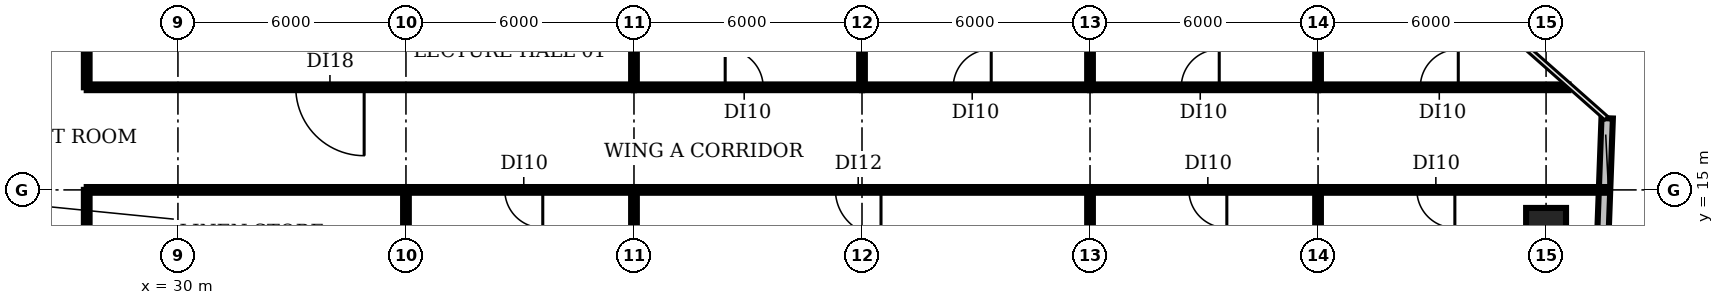
"""IFC4 building model, lengths in metres.
Left out: names, types, materials, properties, quantities, classifications, styles, units other than length and angle.
Written with IfcOpenShell. Run it as: python <this file> out.ifc"""

import sys

from ifc_helpers import new_model, si_unit, direction, frame, frame_2d, origin, origin_2d, place, context, subcontext, project, spatial, rectangle, circle, extrude, element, fill, save


model = new_model("IFC4")
c1 = context("Model", 3, precision=1e-05, world=origin(), true_north=direction((0.0, 1.0)))
c2 = subcontext(c1, "Body", "Model", "MODEL_VIEW")
j1 = project(units=[si_unit("LENGTHUNIT", "METRE"), si_unit("PLANEANGLEUNIT", "RADIAN")], contexts=[c1])
p1 = place(None, origin())
s1 = spatial("IfcSite", under=j1, at=p1, CompositionType="ELEMENT")
p2 = place(p1, origin())
s2 = spatial("IfcBuilding", under=s1, at=p2, CompositionType="ELEMENT")
p3 = place(p2, frame((0.0, 0.0, 66.8)))
s3 = spatial("IfcBuildingStorey", under=s2, at=p3, CompositionType="ELEMENT", Elevation=66.8)
p4 = place(p3, frame((66.0, 14.0, 0.0), z_axis=(0.0, 0.0, 1.0), x_axis=(1.0, 0.0, 0.0)))
e1 = element("IfcColumn", 1, at=p4, inside=s3, PredefinedType="COLUMN", context=c2, shape_type="SweptSolid", body=[
    extrude(circle(Radius=0.525, at=origin_2d()), origin(), (0.0, 0.0, 1.0), 3.85),
])
p5 = place(p3, frame((67.359, 10.104, 0.0), z_axis=(0.0, 0.0, 1.0), x_axis=(0.036732223501, 0.999325144163, 0.0)))
e2 = element("IfcWall", 2, at=p5, inside=s3, PredefinedType="SOLIDWALL", context=c2, shape_type="SweptSolid", body=[
    extrude(rectangle(XDim=6.786, YDim=0.3, at=frame_2d((3.393, 0.0))), origin(), (0.0, 0.0, 1.0), 3.85),
])
p6 = place(p3, frame((27.6, 15.0, 0.0), z_axis=(0.0, 0.0, 1.0), x_axis=(0.0, -1.0, 0.0)))
e3 = element("IfcWall", 3, at=p6, inside=s3, PredefinedType="PARTITIONING", context=c2, shape_type="SweptSolid", body=[
    extrude(rectangle(XDim=10.5, YDim=0.15, at=frame_2d((5.25, 0.0))), origin(), (0.0, 0.0, 1.0), 2.83),
])
p7 = place(p6, frame((4.8, 0.0, 0.0)))
e4 = element("IfcOpeningElement", 4, at=p7, cuts=e3, PredefinedType="OPENING", context=c2, shape_type="SweptSolid", body=[
    extrude(rectangle(XDim=1.0, YDim=2.1, at=frame_2d((0.5, 1.05))), frame((0.0, 0.085, 0.0), z_axis=(0.0, -1.0, 0.0), x_axis=(1.0, 0.0, 0.0)), (0.0, 0.0, 1.0), 0.17),
])
p8 = place(p3, frame((27.6, 15.0, 0.0), z_axis=(0.0, 0.0, 1.0), x_axis=(1.0, 0.0, 0.0)))
e5 = element("IfcWall", 5, at=p8, inside=s3, PredefinedType="PARTITIONING", context=c2, shape_type="SweptSolid", body=[
    extrude(rectangle(XDim=8.4, YDim=0.15, at=frame_2d((4.2, 0.0))), origin(), (0.0, 0.0, 1.0), 2.83),
])
p9 = place(p3, frame((27.6, 17.7, 0.0), z_axis=(0.0, 0.0, 1.0), x_axis=(0.0, 1.0, 0.0)))
e6 = element("IfcWall", 6, at=p9, inside=s3, PredefinedType="PARTITIONING", context=c2, shape_type="SweptSolid", body=[
    extrude(rectangle(XDim=6.17, YDim=0.15, at=frame_2d((3.085, 0.0))), origin(), (0.0, 0.0, 1.0), 2.83),
])
for number, where, z_axis, x_axis in (
    (7, (36.0, -5.01, 0.0), (0.0, 0.0, 1.0), (0.0, 1.0, 0.0)),
    (8, (42.0, -5.01, 0.0), (0.0, 0.0, 1.0), (0.0, 1.0, 0.0)),
):
    element("IfcWall", number, at=place(p3, frame(where, z_axis=z_axis, x_axis=x_axis)), inside=s3, PredefinedType="PARTITIONING", context=c2, shape_type="SweptSolid", body=[
        extrude(rectangle(XDim=20.01, YDim=0.15, at=frame_2d((10.005, 0.0))), origin(), (0.0, 0.0, 1.0), 2.83),
    ])
p10 = place(p3, frame((42.0, 15.0, 0.0), z_axis=(0.0, 0.0, 1.0), x_axis=(-1.0, 0.0, 0.0)))
e9 = element("IfcWall", 9, at=p10, inside=s3, PredefinedType="PARTITIONING", context=c2, shape_type="SweptSolid", body=[
    extrude(rectangle(XDim=6.0, YDim=0.15, at=frame_2d((3.0, 0.0))), origin(), (0.0, 0.0, 1.0), 2.83),
])
p11 = place(p10, frame((2.4, 0.0, 0.0)))
e10 = element("IfcOpeningElement", 10, at=p11, cuts=e9, PredefinedType="OPENING", context=c2, shape_type="SweptSolid", body=[
    extrude(rectangle(XDim=1.0, YDim=2.1, at=frame_2d((0.5, 1.05))), frame((0.0, 0.085, 0.0), z_axis=(0.0, -1.0, 0.0), x_axis=(1.0, 0.0, 0.0)), (0.0, 0.0, 1.0), 0.17),
])
p12 = place(p3, frame((42.0, 17.7, 0.0), z_axis=(0.0, 0.0, 1.0), x_axis=(-1.0, 0.0, 0.0)))
e11 = element("IfcWall", 11, at=p12, inside=s3, PredefinedType="PARTITIONING", context=c2, shape_type="SweptSolid", body=[
    extrude(rectangle(XDim=14.4, YDim=0.15, at=frame_2d((7.2, 0.0))), origin(), (0.0, 0.0, 1.0), 2.83),
])
p13 = place(p12, frame((7.1, 0.0, 0.0)))
e12 = element("IfcOpeningElement", 12, at=p13, cuts=e11, PredefinedType="OPENING", context=c2, shape_type="SweptSolid", body=[
    extrude(rectangle(XDim=1.8, YDim=2.1, at=frame_2d((0.9, 1.05))), frame((0.0, 0.085, 0.0), z_axis=(0.0, -1.0, 0.0), x_axis=(1.0, 0.0, 0.0)), (0.0, 0.0, 1.0), 0.17),
])
p14 = place(p3, frame((42.0, 17.7, 0.0), z_axis=(0.0, 0.0, 1.0), x_axis=(0.0, 1.0, 0.0)))
e13 = element("IfcWall", 13, at=p14, inside=s3, PredefinedType="PARTITIONING", context=c2, shape_type="SweptSolid", body=[
    extrude(rectangle(XDim=4.2, YDim=0.15, at=frame_2d((2.1, 0.0))), origin(), (0.0, 0.0, 1.0), 2.83),
])
p15 = place(p3, frame((42.0, 17.7, 0.0), z_axis=(0.0, 0.0, 1.0), x_axis=(1.0, 0.0, 0.0)))
e14 = element("IfcWall", 14, at=p15, inside=s3, PredefinedType="PARTITIONING", context=c2, shape_type="SweptSolid", body=[
    extrude(rectangle(XDim=6.0, YDim=0.15, at=frame_2d((3.0, 0.0))), origin(), (0.0, 0.0, 1.0), 2.83),
])
p16 = place(p15, frame((2.4, 0.0, 0.0)))
e15 = element("IfcOpeningElement", 15, at=p16, cuts=e14, PredefinedType="OPENING", context=c2, shape_type="SweptSolid", body=[
    extrude(rectangle(XDim=1.0, YDim=2.1, at=frame_2d((0.5, 1.05))), frame((0.0, 0.085, 0.0), z_axis=(0.0, -1.0, 0.0), x_axis=(1.0, 0.0, 0.0)), (0.0, 0.0, 1.0), 0.17),
])
p17 = place(p3, frame((48.0, 17.7, 0.0), z_axis=(0.0, 0.0, 1.0), x_axis=(0.0, 1.0, 0.0)))
e16 = element("IfcWall", 16, at=p17, inside=s3, PredefinedType="PARTITIONING", context=c2, shape_type="SweptSolid", body=[
    extrude(rectangle(XDim=4.57, YDim=0.15, at=frame_2d((2.285, 0.0))), origin(), (0.0, 0.0, 1.0), 2.83),
])
p18 = place(p3, frame((48.0, 17.7, 0.0), z_axis=(0.0, 0.0, 1.0), x_axis=(1.0, 0.0, 0.0)))
e17 = element("IfcWall", 17, at=p18, inside=s3, PredefinedType="PARTITIONING", context=c2, shape_type="SweptSolid", body=[
    extrude(rectangle(XDim=6.0, YDim=0.15, at=frame_2d((3.0, 0.0))), origin(), (0.0, 0.0, 1.0), 2.83),
])
p19 = place(p18, frame((2.4, 0.0, 0.0)))
e18 = element("IfcOpeningElement", 18, at=p19, cuts=e17, PredefinedType="OPENING", context=c2, shape_type="SweptSolid", body=[
    extrude(rectangle(XDim=1.0, YDim=2.1, at=frame_2d((0.5, 1.05))), frame((0.0, 0.085, 0.0), z_axis=(0.0, -1.0, 0.0), x_axis=(1.0, 0.0, 0.0)), (0.0, 0.0, 1.0), 0.17),
])
p20 = place(p3, frame((54.0, -4.993, 0.0), z_axis=(0.0, 0.0, 1.0), x_axis=(0.0, 1.0, 0.0)))
e19 = element("IfcWall", 19, at=p20, inside=s3, PredefinedType="PARTITIONING", context=c2, shape_type="SweptSolid", body=[
    extrude(rectangle(XDim=19.993, YDim=0.15, at=frame_2d((9.997, 0.0))), origin(), (0.0, 0.0, 1.0), 2.83),
])
p21 = place(p3, frame((54.0, 15.0, 0.0), z_axis=(0.0, 0.0, 1.0), x_axis=(-1.0, 0.0, 0.0)))
e20 = element("IfcWall", 20, at=p21, inside=s3, PredefinedType="PARTITIONING", context=c2, shape_type="SweptSolid", body=[
    extrude(rectangle(XDim=12.0, YDim=0.15, at=frame_2d((6.0, 0.0))), origin(), (0.0, 0.0, 1.0), 2.83),
])
p22 = place(p21, frame((5.5, 0.0, 0.0)))
e21 = element("IfcOpeningElement", 21, at=p22, cuts=e20, PredefinedType="OPENING", context=c2, shape_type="SweptSolid", body=[
    extrude(rectangle(XDim=1.2, YDim=2.1, at=frame_2d((0.6, 1.05))), frame((0.0, 0.085, 0.0), z_axis=(0.0, -1.0, 0.0), x_axis=(1.0, 0.0, 0.0)), (0.0, 0.0, 1.0), 0.17),
])
p23 = place(p3, frame((54.0, 17.7, 0.0), z_axis=(0.0, 0.0, 1.0), x_axis=(0.0, 1.0, 0.0)))
e22 = element("IfcWall", 22, at=p23, inside=s3, PredefinedType="PARTITIONING", context=c2, shape_type="SweptSolid", body=[
    extrude(rectangle(XDim=4.94, YDim=0.15, at=frame_2d((2.47, 0.0))), origin(), (0.0, 0.0, 1.0), 2.83),
])
p24 = place(p3, frame((54.0, 17.7, 0.0), z_axis=(0.0, 0.0, 1.0), x_axis=(1.0, 0.0, 0.0)))
e23 = element("IfcWall", 23, at=p24, inside=s3, PredefinedType="PARTITIONING", context=c2, shape_type="SweptSolid", body=[
    extrude(rectangle(XDim=6.0, YDim=0.15, at=frame_2d((3.0, 0.0))), origin(), (0.0, 0.0, 1.0), 2.83),
])
p25 = place(p24, frame((2.4, 0.0, 0.0)))
e24 = element("IfcOpeningElement", 24, at=p25, cuts=e23, PredefinedType="OPENING", context=c2, shape_type="SweptSolid", body=[
    extrude(rectangle(XDim=1.0, YDim=2.1, at=frame_2d((0.5, 1.05))), frame((0.0, 0.085, 0.0), z_axis=(0.0, -1.0, 0.0), x_axis=(1.0, 0.0, 0.0)), (0.0, 0.0, 1.0), 0.17),
])
p26 = place(p3, frame((60.0, -5.01, 0.0), z_axis=(0.0, 0.0, 1.0), x_axis=(0.0, 1.0, 0.0)))
e25 = element("IfcWall", 25, at=p26, inside=s3, PredefinedType="PARTITIONING", context=c2, shape_type="SweptSolid", body=[
    extrude(rectangle(XDim=20.01, YDim=0.15, at=frame_2d((10.005, 0.0))), origin(), (0.0, 0.0, 1.0), 2.83),
])
p27 = place(p3, frame((60.0, 15.0, 0.0), z_axis=(0.0, 0.0, 1.0), x_axis=(-1.0, 0.0, 0.0)))
e26 = element("IfcWall", 26, at=p27, inside=s3, PredefinedType="PARTITIONING", context=c2, shape_type="SweptSolid", body=[
    extrude(rectangle(XDim=6.0, YDim=0.15, at=frame_2d((3.0, 0.0))), origin(), (0.0, 0.0, 1.0), 2.83),
])
p28 = place(p27, frame((2.4, 0.0, 0.0)))
e27 = element("IfcOpeningElement", 27, at=p28, cuts=e26, PredefinedType="OPENING", context=c2, shape_type="SweptSolid", body=[
    extrude(rectangle(XDim=1.0, YDim=2.1, at=frame_2d((0.5, 1.05))), frame((0.0, 0.085, 0.0), z_axis=(0.0, -1.0, 0.0), x_axis=(1.0, 0.0, 0.0)), (0.0, 0.0, 1.0), 0.17),
])
p29 = place(p3, frame((60.0, 17.7, 0.0), z_axis=(0.0, 0.0, 1.0), x_axis=(0.0, 1.0, 0.0)))
e28 = element("IfcWall", 28, at=p29, inside=s3, PredefinedType="PARTITIONING", context=c2, shape_type="SweptSolid", body=[
    extrude(rectangle(XDim=5.3, YDim=0.15, at=frame_2d((2.65, 0.0))), origin(), (0.0, 0.0, 1.0), 2.83),
])
p30 = place(p3, frame((60.0, 17.7, 0.0), z_axis=(0.0, 0.0, 1.0), x_axis=(1.0, 0.0, 0.0)))
e29 = element("IfcWall", 29, at=p30, inside=s3, PredefinedType="PARTITIONING", context=c2, shape_type="SweptSolid", body=[
    extrude(rectangle(XDim=6.59, YDim=0.15, at=frame_2d((3.295, 0.0))), origin(), (0.0, 0.0, 1.0), 2.83),
])
p31 = place(p30, frame((2.69, 0.0, 0.0)))
e30 = element("IfcOpeningElement", 30, at=p31, cuts=e29, PredefinedType="OPENING", context=c2, shape_type="SweptSolid", body=[
    extrude(rectangle(XDim=1.0, YDim=2.1, at=frame_2d((0.5, 1.05))), frame((0.0, 0.085, 0.0), z_axis=(0.0, -1.0, 0.0), x_axis=(1.0, 0.0, 0.0)), (0.0, 0.0, 1.0), 0.17),
])
p32 = place(p3, frame((67.576, 15.0, 0.0), z_axis=(0.0, 0.0, 1.0), x_axis=(-1.0, 0.0, 0.0)))
e31 = element("IfcWall", 31, at=p32, inside=s3, PredefinedType="PARTITIONING", context=c2, shape_type="SweptSolid", body=[
    extrude(rectangle(XDim=7.576, YDim=0.15, at=frame_2d((3.788, 0.0))), origin(), (0.0, 0.0, 1.0), 2.83),
])
p33 = place(p32, frame((3.976, 0.0, 0.0)))
e32 = element("IfcOpeningElement", 32, at=p33, cuts=e31, PredefinedType="OPENING", context=c2, shape_type="SweptSolid", body=[
    extrude(rectangle(XDim=1.0, YDim=2.1, at=frame_2d((0.5, 1.05))), frame((0.0, 0.085, 0.0), z_axis=(0.0, -1.0, 0.0), x_axis=(1.0, 0.0, 0.0)), (0.0, 0.0, 1.0), 0.17),
])
p34 = place(p11, origin())
e33 = element("IfcDoor", 33, at=p34, inside=s3, OperationType="SINGLE_SWING_LEFT", PredefinedType="DOOR", context=c2, shape_type="SweptSolid", body=[
    extrude(rectangle(XDim=1.0, YDim=2.1, at=frame_2d((0.5, 1.05))), frame((0.0, 0.025, 0.0), z_axis=(0.0, -1.0, 0.0), x_axis=(1.0, 0.0, 0.0)), (0.0, 0.0, 1.0), 0.05),
])
fill(e10, e33)
p35 = place(p13, origin())
e34 = element("IfcDoor", 34, at=p35, inside=s3, OperationType="SINGLE_SWING_LEFT", PredefinedType="DOOR", context=c2, shape_type="SweptSolid", body=[
    extrude(rectangle(XDim=1.8, YDim=2.1, at=frame_2d((0.9, 1.05))), frame((0.0, 0.025, 0.0), z_axis=(0.0, -1.0, 0.0), x_axis=(1.0, 0.0, 0.0)), (0.0, 0.0, 1.0), 0.05),
])
fill(e12, e34)
p36 = place(p16, origin())
e35 = element("IfcDoor", 35, at=p36, inside=s3, OperationType="SINGLE_SWING_LEFT", PredefinedType="DOOR", context=c2, shape_type="SweptSolid", body=[
    extrude(rectangle(XDim=1.0, YDim=2.1, at=frame_2d((0.5, 1.05))), frame((0.0, 0.025, 0.0), z_axis=(0.0, -1.0, 0.0), x_axis=(1.0, 0.0, 0.0)), (0.0, 0.0, 1.0), 0.05),
])
fill(e15, e35)
p37 = place(p19, origin())
e36 = element("IfcDoor", 36, at=p37, inside=s3, OperationType="SINGLE_SWING_RIGHT", PredefinedType="DOOR", context=c2, shape_type="SweptSolid", body=[
    extrude(rectangle(XDim=1.0, YDim=2.1, at=frame_2d((0.5, 1.05))), frame((0.0, 0.025, 0.0), z_axis=(0.0, -1.0, 0.0), x_axis=(1.0, 0.0, 0.0)), (0.0, 0.0, 1.0), 0.05),
])
fill(e18, e36)
p38 = place(p22, origin())
e37 = element("IfcDoor", 37, at=p38, inside=s3, OperationType="SINGLE_SWING_LEFT", PredefinedType="DOOR", context=c2, shape_type="SweptSolid", body=[
    extrude(rectangle(XDim=1.2, YDim=2.1, at=frame_2d((0.6, 1.05))), frame((0.0, 0.025, 0.0), z_axis=(0.0, -1.0, 0.0), x_axis=(1.0, 0.0, 0.0)), (0.0, 0.0, 1.0), 0.05),
])
fill(e21, e37)
p39 = place(p25, origin())
e38 = element("IfcDoor", 38, at=p39, inside=s3, OperationType="SINGLE_SWING_RIGHT", PredefinedType="DOOR", context=c2, shape_type="SweptSolid", body=[
    extrude(rectangle(XDim=1.0, YDim=2.1, at=frame_2d((0.5, 1.05))), frame((0.0, 0.025, 0.0), z_axis=(0.0, -1.0, 0.0), x_axis=(1.0, 0.0, 0.0)), (0.0, 0.0, 1.0), 0.05),
])
fill(e24, e38)
p40 = place(p28, origin())
e39 = element("IfcDoor", 39, at=p40, inside=s3, OperationType="SINGLE_SWING_LEFT", PredefinedType="DOOR", context=c2, shape_type="SweptSolid", body=[
    extrude(rectangle(XDim=1.0, YDim=2.1, at=frame_2d((0.5, 1.05))), frame((0.0, 0.025, 0.0), z_axis=(0.0, -1.0, 0.0), x_axis=(1.0, 0.0, 0.0)), (0.0, 0.0, 1.0), 0.05),
])
fill(e27, e39)
p41 = place(p31, origin())
e40 = element("IfcDoor", 40, at=p41, inside=s3, OperationType="SINGLE_SWING_RIGHT", PredefinedType="DOOR", context=c2, shape_type="SweptSolid", body=[
    extrude(rectangle(XDim=1.0, YDim=2.1, at=frame_2d((0.5, 1.05))), frame((0.0, 0.025, 0.0), z_axis=(0.0, -1.0, 0.0), x_axis=(1.0, 0.0, 0.0)), (0.0, 0.0, 1.0), 0.05),
])
fill(e30, e40)
p42 = place(p33, origin())
e41 = element("IfcDoor", 41, at=p42, inside=s3, OperationType="SINGLE_SWING_LEFT", PredefinedType="DOOR", context=c2, shape_type="SweptSolid", body=[
    extrude(rectangle(XDim=1.0, YDim=2.1, at=frame_2d((0.5, 1.05))), frame((0.0, 0.025, 0.0), z_axis=(0.0, -1.0, 0.0), x_axis=(1.0, 0.0, 0.0)), (0.0, 0.0, 1.0), 0.05),
])
fill(e32, e41)
save(model, sys.argv[1])
